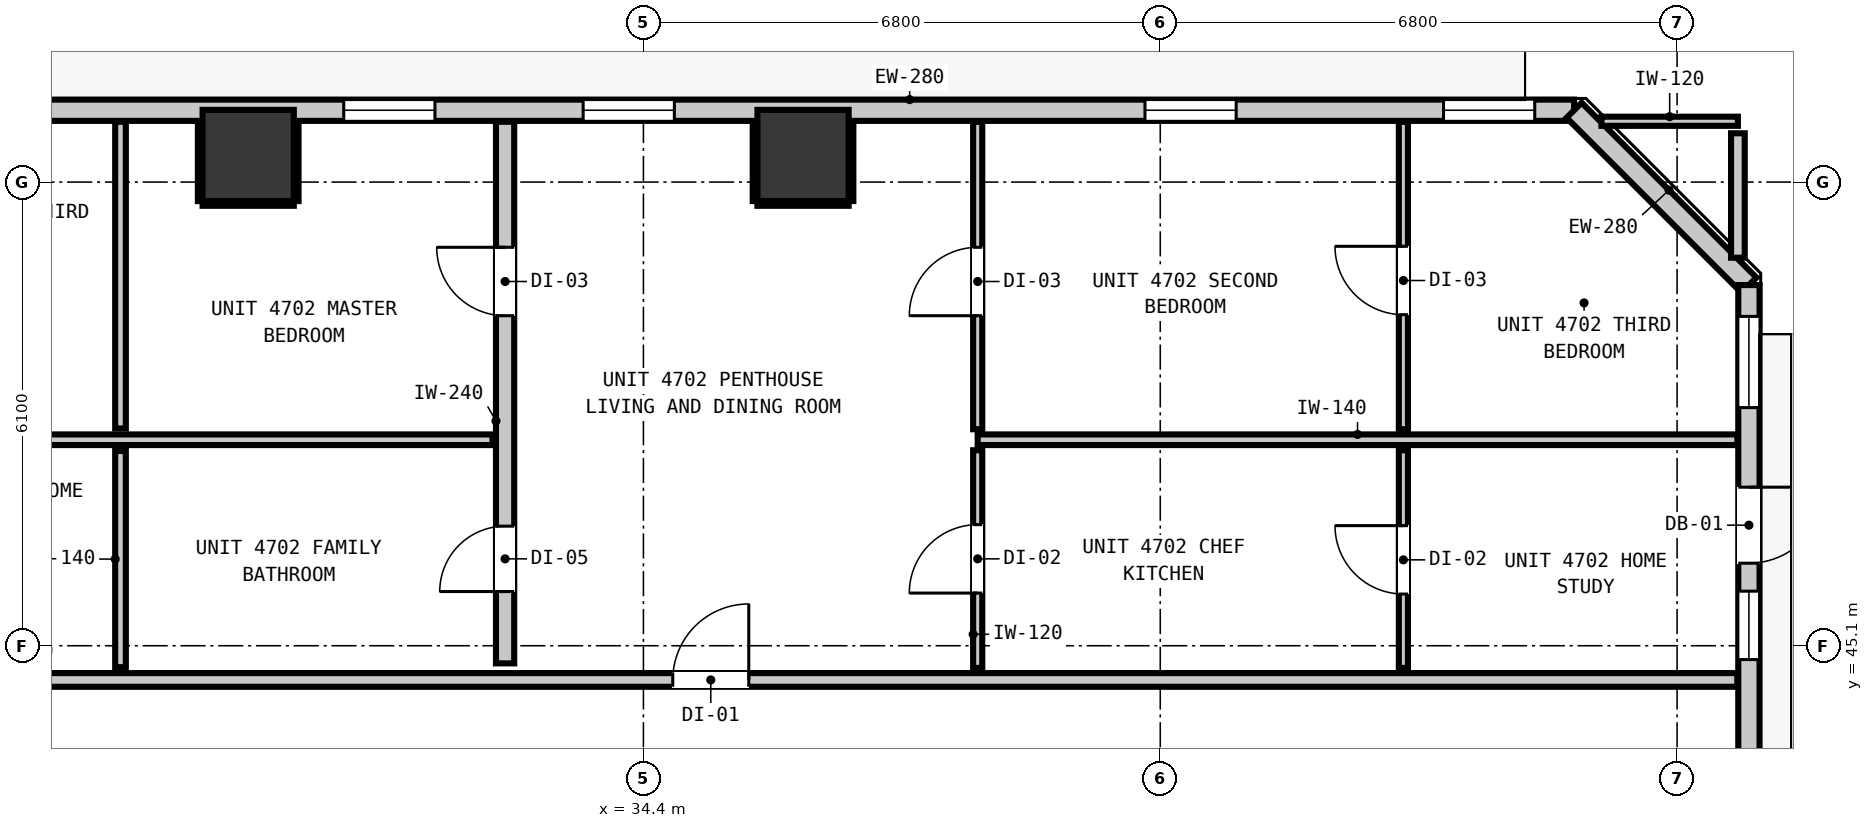
"""IFC4 building model, lengths in metres.
Left out: names, types, materials, properties, quantities, classifications, styles, units other than length and angle.
Written with IfcOpenShell. Run it as: python <this file> out.ifc"""

import sys

from ifc_helpers import new_model, si_unit, direction, frame, frame_2d, origin, origin_2d, place, context, subcontext, project, spatial, rectangle, extrude, element, fill, save


model = new_model("IFC4")
c1 = context("Model", 3, precision=1e-05, world=origin(), true_north=direction((0.0, 1.0)))
c2 = subcontext(c1, "Body", "Model", "MODEL_VIEW")
j1 = project(units=[si_unit("LENGTHUNIT", "METRE"), si_unit("PLANEANGLEUNIT", "RADIAN")], contexts=[c1])
p1 = place(None, origin())
s1 = spatial("IfcSite", under=j1, at=p1, CompositionType="ELEMENT")
p2 = place(p1, origin())
s2 = spatial("IfcBuilding", under=s1, at=p2, CompositionType="ELEMENT")
p3 = place(p2, frame((0.0, 0.0, 162.52)))
s3 = spatial("IfcBuildingStorey", under=s2, at=p3, CompositionType="ELEMENT", Elevation=162.52)
for number, where, z_axis, x_axis in (
    (1, (29.2, 51.55, 0.0), (0.0, 0.0, 1.0), (1.0, 0.0, 0.0)),
    (2, (36.5, 51.55, 0.0), (0.0, 0.0, 1.0), (1.0, 0.0, 0.0)),
):
    element("IfcColumn", number, at=place(p3, frame(where, z_axis=z_axis, x_axis=x_axis)), inside=s3, PredefinedType="COLUMN", context=c2, shape_type="SweptSolid", body=[
        extrude(rectangle(XDim=1.2, YDim=1.2, at=origin_2d()), origin(), (0.0, 0.0, 1.0), 2.9),
    ])
p4 = place(p3, frame((11.555, 52.145, 0.0), z_axis=(0.0, 0.0, 1.0), x_axis=(1.0, 0.0, 0.0)))
e3 = element("IfcWall", 3, at=p4, inside=s3, PredefinedType="STANDARD", context=c2, shape_type="SweptSolid", body=[
    extrude(rectangle(XDim=35.09, YDim=0.28, at=frame_2d((17.545, 0.0))), origin(), (0.0, 0.0, 1.0), 2.9),
])
p5 = place(p4, frame((4.062, 0.0, 0.0)))
e4 = element("IfcOpeningElement", 4, at=p5, cuts=e3, PredefinedType="OPENING", context=c2, shape_type="SweptSolid", body=[
    extrude(rectangle(XDim=1.0, YDim=2.15, at=frame_2d((0.5, 1.075))), frame((0.0, 0.15, 0.0), z_axis=(0.0, -1.0, 0.0), x_axis=(1.0, 0.0, 0.0)), (0.0, 0.0, 1.0), 0.3),
])
p6 = place(p4, frame((5.813, 0.0, 0.85)))
e5 = element("IfcOpeningElement", 5, at=p6, cuts=e3, PredefinedType="OPENING", context=c2, shape_type="SweptSolid", body=[
    extrude(rectangle(XDim=1.2, YDim=1.8, at=frame_2d((0.6, 0.9))), frame((0.0, 0.15, 0.0), z_axis=(0.0, -1.0, 0.0), x_axis=(1.0, 0.0, 0.0)), (0.0, 0.0, 1.0), 0.3),
])
p7 = place(p4, frame((0.378, 0.0, 0.85)))
e6 = element("IfcOpeningElement", 6, at=p7, cuts=e3, PredefinedType="OPENING", context=c2, shape_type="SweptSolid", body=[
    extrude(rectangle(XDim=0.58, YDim=1.5, at=frame_2d((0.29, 0.75))), frame((0.0, 0.15, 0.0), z_axis=(0.0, -1.0, 0.0), x_axis=(1.0, 0.0, 0.0)), (0.0, 0.0, 1.0), 0.3),
])
p8 = place(p4, frame((10.429, 0.0, 0.85)))
e7 = element("IfcOpeningElement", 7, at=p8, cuts=e3, PredefinedType="OPENING", context=c2, shape_type="SweptSolid", body=[
    extrude(rectangle(XDim=1.2, YDim=1.8, at=frame_2d((0.6, 0.9))), frame((0.0, 0.15, 0.0), z_axis=(0.0, -1.0, 0.0), x_axis=(1.0, 0.0, 0.0)), (0.0, 0.0, 1.0), 0.3),
])
p9 = place(p4, frame((13.539, 0.0, 0.85)))
e8 = element("IfcOpeningElement", 8, at=p9, cuts=e3, PredefinedType="OPENING", context=c2, shape_type="SweptSolid", body=[
    extrude(rectangle(XDim=1.2, YDim=1.8, at=frame_2d((0.6, 0.9))), frame((0.0, 0.15, 0.0), z_axis=(0.0, -1.0, 0.0), x_axis=(1.0, 0.0, 0.0)), (0.0, 0.0, 1.0), 0.3),
])
p10 = place(p4, frame((22.052, 0.0, 0.85)))
e9 = element("IfcOpeningElement", 9, at=p10, cuts=e3, PredefinedType="OPENING", context=c2, shape_type="SweptSolid", body=[
    extrude(rectangle(XDim=1.2, YDim=1.8, at=frame_2d((0.6, 0.9))), frame((0.0, 0.15, 0.0), z_axis=(0.0, -1.0, 0.0), x_axis=(1.0, 0.0, 0.0)), (0.0, 0.0, 1.0), 0.3),
])
p11 = place(p4, frame((18.902, 0.0, 0.85)))
e10 = element("IfcOpeningElement", 10, at=p11, cuts=e3, PredefinedType="OPENING", context=c2, shape_type="SweptSolid", body=[
    extrude(rectangle(XDim=1.2, YDim=1.8, at=frame_2d((0.6, 0.9))), frame((0.0, 0.15, 0.0), z_axis=(0.0, -1.0, 0.0), x_axis=(1.0, 0.0, 0.0)), (0.0, 0.0, 1.0), 0.3),
])
p12 = place(p4, frame((29.444, 0.0, 0.85)))
e11 = element("IfcOpeningElement", 11, at=p12, cuts=e3, PredefinedType="OPENING", context=c2, shape_type="SweptSolid", body=[
    extrude(rectangle(XDim=1.2, YDim=1.8, at=frame_2d((0.6, 0.9))), frame((0.0, 0.15, 0.0), z_axis=(0.0, -1.0, 0.0), x_axis=(1.0, 0.0, 0.0)), (0.0, 0.0, 1.0), 0.3),
])
p13 = place(p4, frame((33.372, 0.0, 0.85)))
e12 = element("IfcOpeningElement", 12, at=p13, cuts=e3, PredefinedType="OPENING", context=c2, shape_type="SweptSolid", body=[
    extrude(rectangle(XDim=1.2, YDim=1.8, at=frame_2d((0.6, 0.9))), frame((0.0, 0.15, 0.0), z_axis=(0.0, -1.0, 0.0), x_axis=(1.0, 0.0, 0.0)), (0.0, 0.0, 1.0), 0.3),
])
p14 = place(p3, frame((46.645, 52.145, 0.0), z_axis=(0.0, 0.0, 1.0), x_axis=(0.707106781187, -0.707106781187, 0.0)))
e13 = element("IfcWall", 13, at=p14, inside=s3, PredefinedType="STANDARD", context=c2, shape_type="SweptSolid", body=[
    extrude(rectangle(XDim=3.253, YDim=0.28, at=frame_2d((1.626, 0.0))), origin(), (0.0, 0.0, 1.0), 2.9),
])
p15 = place(p3, frame((48.945, 49.845, 0.0), z_axis=(0.0, 0.0, 1.0), x_axis=(0.0, -1.0, 0.0)))
e14 = element("IfcWall", 14, at=p15, inside=s3, PredefinedType="STANDARD", context=c2, shape_type="SweptSolid", body=[
    extrude(rectangle(XDim=32.29, YDim=0.28, at=frame_2d((16.145, 0.0))), origin(), (0.0, 0.0, 1.0), 2.9),
])
p16 = place(p15, frame((2.659, 0.0, 0.0)))
e15 = element("IfcOpeningElement", 15, at=p16, cuts=e14, PredefinedType="OPENING", context=c2, shape_type="SweptSolid", body=[
    extrude(rectangle(XDim=1.0, YDim=2.15, at=frame_2d((0.5, 1.075))), frame((0.0, 0.15, 0.0), z_axis=(0.0, -1.0, 0.0), x_axis=(1.0, 0.0, 0.0)), (0.0, 0.0, 1.0), 0.3),
])
p17 = place(p15, frame((30.747, 0.0, 0.85)))
e16 = element("IfcOpeningElement", 16, at=p17, cuts=e14, PredefinedType="OPENING", context=c2, shape_type="SweptSolid", body=[
    extrude(rectangle(XDim=1.2, YDim=1.8, at=frame_2d((0.6, 0.9))), frame((0.0, 0.15, 0.0), z_axis=(0.0, -1.0, 0.0), x_axis=(1.0, 0.0, 0.0)), (0.0, 0.0, 1.0), 0.3),
])
p18 = place(p15, frame((4.027, 0.0, 0.85)))
e17 = element("IfcOpeningElement", 17, at=p18, cuts=e14, PredefinedType="OPENING", context=c2, shape_type="SweptSolid", body=[
    extrude(rectangle(XDim=0.9, YDim=1.5, at=frame_2d((0.45, 0.75))), frame((0.0, 0.15, 0.0), z_axis=(0.0, -1.0, 0.0), x_axis=(1.0, 0.0, 0.0)), (0.0, 0.0, 1.0), 0.3),
])
p19 = place(p15, frame((0.412, 0.0, 0.85)))
e18 = element("IfcOpeningElement", 18, at=p19, cuts=e14, PredefinedType="OPENING", context=c2, shape_type="SweptSolid", body=[
    extrude(rectangle(XDim=1.2, YDim=1.8, at=frame_2d((0.6, 0.9))), frame((0.0, 0.15, 0.0), z_axis=(0.0, -1.0, 0.0), x_axis=(1.0, 0.0, 0.0)), (0.0, 0.0, 1.0), 0.3),
])
p20 = place(p15, frame((22.895, 0.0, 0.85)))
e19 = element("IfcOpeningElement", 19, at=p20, cuts=e14, PredefinedType="OPENING", context=c2, shape_type="SweptSolid", body=[
    extrude(rectangle(XDim=1.2, YDim=1.8, at=frame_2d((0.6, 0.9))), frame((0.0, 0.15, 0.0), z_axis=(0.0, -1.0, 0.0), x_axis=(1.0, 0.0, 0.0)), (0.0, 0.0, 1.0), 0.3),
])
p21 = place(p3, frame((9.407, 44.65, 0.0), z_axis=(0.0, 0.0, 1.0), x_axis=(1.0, 0.0, 0.0)))
e20 = element("IfcWall", 20, at=p21, inside=s3, PredefinedType="PARTITIONING", context=c2, shape_type="SweptSolid", body=[
    extrude(rectangle(XDim=39.386, YDim=0.18, at=frame_2d((19.693, 0.0))), origin(), (0.0, 0.0, 1.0), 2.9),
])
p22 = place(p21, frame((7.193, 0.0, 0.0)))
e21 = element("IfcOpeningElement", 21, at=p22, cuts=e20, PredefinedType="OPENING", context=c2, shape_type="SweptSolid", body=[
    extrude(rectangle(XDim=1.0, YDim=2.15, at=frame_2d((0.5, 1.075))), frame((0.0, 0.1, 0.0), z_axis=(0.0, -1.0, 0.0), x_axis=(1.0, 0.0, 0.0)), (0.0, 0.0, 1.0), 0.2),
])
p23 = place(p21, frame((25.379, 0.0, 0.0)))
e22 = element("IfcOpeningElement", 22, at=p23, cuts=e20, PredefinedType="OPENING", context=c2, shape_type="SweptSolid", body=[
    extrude(rectangle(XDim=1.0, YDim=2.15, at=frame_2d((0.5, 1.075))), frame((0.0, 0.1, 0.0), z_axis=(0.0, -1.0, 0.0), x_axis=(1.0, 0.0, 0.0)), (0.0, 0.0, 1.0), 0.2),
])
p24 = place(p3, frame((19.22, 47.81, 0.0), z_axis=(0.0, 0.0, 1.0), x_axis=(1.0, 0.0, 0.0)))
e23 = element("IfcWall", 23, at=p24, inside=s3, PredefinedType="PARTITIONING", context=c2, shape_type="SweptSolid", body=[
    extrude(rectangle(XDim=13.194, YDim=0.14, at=frame_2d((6.597, 0.0))), origin(), (0.0, 0.0, 1.0), 2.9),
])
p25 = place(p3, frame((38.798, 47.81, 0.0), z_axis=(0.0, 0.0, 1.0), x_axis=(1.0, 0.0, 0.0)))
e24 = element("IfcWall", 24, at=p25, inside=s3, PredefinedType="PARTITIONING", context=c2, shape_type="SweptSolid", body=[
    extrude(rectangle(XDim=9.995, YDim=0.14, at=frame_2d((4.998, 0.0))), origin(), (0.0, 0.0, 1.0), 2.9),
])
p26 = place(p3, frame((47.005, 52.0, 0.0), z_axis=(0.0, 0.0, 1.0), x_axis=(1.0, 0.0, 0.0)))
e25 = element("IfcWall", 25, at=p26, inside=s3, PredefinedType="PARTITIONING", context=c2, shape_type="SweptSolid", body=[
    extrude(rectangle(XDim=1.795, YDim=0.12, at=frame_2d((0.897, 0.0))), origin(), (0.0, 0.0, 1.0), 2.9),
])
p27 = place(p3, frame((32.58, 44.868, 0.0), z_axis=(0.0, 0.0, 1.0), x_axis=(0.0, 1.0, 0.0)))
e26 = element("IfcWall", 26, at=p27, inside=s3, PredefinedType="PARTITIONING", context=c2, shape_type="SweptSolid", body=[
    extrude(rectangle(XDim=7.125, YDim=0.24, at=frame_2d((3.562, 0.0))), origin(), (0.0, 0.0, 1.0), 2.9),
])
p28 = place(p27, frame((0.945, 0.0, 0.0)))
e27 = element("IfcOpeningElement", 27, at=p28, cuts=e26, PredefinedType="OPENING", context=c2, shape_type="SweptSolid", body=[
    extrude(rectangle(XDim=0.86, YDim=2.02, at=frame_2d((0.43, 1.01))), frame((0.0, 0.13, 0.0), z_axis=(0.0, -1.0, 0.0), x_axis=(1.0, 0.0, 0.0)), (0.0, 0.0, 1.0), 0.26),
])
p29 = place(p27, frame((4.574, 0.0, 0.0)))
e28 = element("IfcOpeningElement", 28, at=p29, cuts=e26, PredefinedType="OPENING", context=c2, shape_type="SweptSolid", body=[
    extrude(rectangle(XDim=0.9, YDim=2.1, at=frame_2d((0.45, 1.05))), frame((0.0, 0.13, 0.0), z_axis=(0.0, -1.0, 0.0), x_axis=(1.0, 0.0, 0.0)), (0.0, 0.0, 1.0), 0.26),
])
p30 = place(p3, frame((48.8, 50.205, 0.0), z_axis=(0.0, 0.0, 1.0), x_axis=(0.0, 1.0, 0.0)))
e29 = element("IfcWall", 29, at=p30, inside=s3, PredefinedType="PARTITIONING", context=c2, shape_type="SweptSolid", body=[
    extrude(rectangle(XDim=1.637, YDim=0.18, at=frame_2d((0.818, 0.0))), origin(), (0.0, 0.0, 1.0), 2.9),
])
p31 = place(p3, frame((27.52, 44.818, 0.0), z_axis=(0.0, 0.0, 1.0), x_axis=(0.0, 1.0, 0.0)))
e30 = element("IfcWall", 30, at=p31, inside=s3, PredefinedType="PARTITIONING", context=c2, shape_type="SweptSolid", body=[
    extrude(rectangle(XDim=2.844, YDim=0.14, at=frame_2d((1.422, 0.0))), origin(), (0.0, 0.0, 1.0), 2.9),
])
p32 = place(p3, frame((27.52, 47.958, 0.0), z_axis=(0.0, 0.0, 1.0), x_axis=(0.0, 1.0, 0.0)))
e31 = element("IfcWall", 31, at=p32, inside=s3, PredefinedType="PARTITIONING", context=c2, shape_type="SweptSolid", body=[
    extrude(rectangle(XDim=4.035, YDim=0.14, at=frame_2d((2.018, 0.0))), origin(), (0.0, 0.0, 1.0), 2.9),
])
p33 = place(p3, frame((38.798, 44.808, 0.0), z_axis=(0.0, 0.0, 1.0), x_axis=(0.0, 1.0, 0.0)))
e32 = element("IfcWall", 32, at=p33, inside=s3, PredefinedType="PARTITIONING", context=c2, shape_type="SweptSolid", body=[
    extrude(rectangle(XDim=2.864, YDim=0.12, at=frame_2d((1.432, 0.0))), origin(), (0.0, 0.0, 1.0), 2.9),
])
p34 = place(p33, frame((0.985, 0.0, 0.0)))
e33 = element("IfcOpeningElement", 33, at=p34, cuts=e32, PredefinedType="OPENING", context=c2, shape_type="SweptSolid", body=[
    extrude(rectangle(XDim=0.9, YDim=2.1, at=frame_2d((0.45, 1.05))), frame((0.0, 0.07, 0.0), z_axis=(0.0, -1.0, 0.0), x_axis=(1.0, 0.0, 0.0)), (0.0, 0.0, 1.0), 0.14),
])
p35 = place(p3, frame((38.798, 47.948, 0.0), z_axis=(0.0, 0.0, 1.0), x_axis=(0.0, 1.0, 0.0)))
e34 = element("IfcWall", 34, at=p35, inside=s3, PredefinedType="PARTITIONING", context=c2, shape_type="SweptSolid", body=[
    extrude(rectangle(XDim=4.045, YDim=0.12, at=frame_2d((2.022, 0.0))), origin(), (0.0, 0.0, 1.0), 2.9),
])
p36 = place(p35, frame((1.494, 0.0, 0.0)))
e35 = element("IfcOpeningElement", 35, at=p36, cuts=e34, PredefinedType="OPENING", context=c2, shape_type="SweptSolid", body=[
    extrude(rectangle(XDim=0.9, YDim=2.1, at=frame_2d((0.45, 1.05))), frame((0.0, 0.07, 0.0), z_axis=(0.0, -1.0, 0.0), x_axis=(1.0, 0.0, 0.0)), (0.0, 0.0, 1.0), 0.14),
])
p37 = place(p3, frame((44.399, 44.808, 0.0), z_axis=(0.0, 0.0, 1.0), x_axis=(0.0, 1.0, 0.0)))
e36 = element("IfcWall", 36, at=p37, inside=s3, PredefinedType="PARTITIONING", context=c2, shape_type="SweptSolid", body=[
    extrude(rectangle(XDim=2.864, YDim=0.12, at=frame_2d((1.432, 0.0))), origin(), (0.0, 0.0, 1.0), 2.9),
])
p38 = place(p37, frame((0.972, 0.0, 0.0)))
e37 = element("IfcOpeningElement", 37, at=p38, cuts=e36, PredefinedType="OPENING", context=c2, shape_type="SweptSolid", body=[
    extrude(rectangle(XDim=0.9, YDim=2.1, at=frame_2d((0.45, 1.05))), frame((0.0, 0.07, 0.0), z_axis=(0.0, -1.0, 0.0), x_axis=(1.0, 0.0, 0.0)), (0.0, 0.0, 1.0), 0.14),
])
p39 = place(p3, frame((44.399, 47.948, 0.0), z_axis=(0.0, 0.0, 1.0), x_axis=(0.0, 1.0, 0.0)))
e38 = element("IfcWall", 38, at=p39, inside=s3, PredefinedType="PARTITIONING", context=c2, shape_type="SweptSolid", body=[
    extrude(rectangle(XDim=4.045, YDim=0.12, at=frame_2d((2.022, 0.0))), origin(), (0.0, 0.0, 1.0), 2.9),
])
p40 = place(p39, frame((1.507, 0.0, 0.0)))
e39 = element("IfcOpeningElement", 39, at=p40, cuts=e38, PredefinedType="OPENING", context=c2, shape_type="SweptSolid", body=[
    extrude(rectangle(XDim=0.9, YDim=2.1, at=frame_2d((0.45, 1.05))), frame((0.0, 0.07, 0.0), z_axis=(0.0, -1.0, 0.0), x_axis=(1.0, 0.0, 0.0)), (0.0, 0.0, 1.0), 0.14),
])
p41 = place(p3, frame((28.6, 50.918, 0.0), z_axis=(0.0, 0.0, 1.0), x_axis=(1.0, 0.0, 0.0)))
e40 = element("IfcWall", 40, at=p41, inside=s3, PredefinedType="PARTITIONING", context=c2, shape_type="SweptSolid", body=[
    extrude(rectangle(XDim=1.2, YDim=0.06, at=frame_2d((0.6, 0.0))), origin(), (0.0, 0.0, 1.0), 1.45),
])
for number, where, z_axis, x_axis in (
    (41, (28.568, 50.95, 0.0), (0.0, 0.0, 1.0), (0.0, 1.0, 0.0)),
    (42, (29.832, 50.95, 0.0), (0.0, 0.0, 1.0), (0.0, 1.0, 0.0)),
):
    element("IfcWall", number, at=place(p3, frame(where, z_axis=z_axis, x_axis=x_axis)), inside=s3, PredefinedType="PARTITIONING", context=c2, shape_type="SweptSolid", body=[
        extrude(rectangle(XDim=1.04, YDim=0.06, at=frame_2d((0.52, 0.0))), origin(), (0.0, 0.0, 1.0), 0.905),
    ])
p42 = place(p3, frame((35.9, 50.918, 0.0), z_axis=(0.0, 0.0, 1.0), x_axis=(1.0, 0.0, 0.0)))
e43 = element("IfcWall", 43, at=p42, inside=s3, PredefinedType="PARTITIONING", context=c2, shape_type="SweptSolid", body=[
    extrude(rectangle(XDim=1.2, YDim=0.06, at=frame_2d((0.6, 0.0))), origin(), (0.0, 0.0, 1.0), 1.45),
])
for number, where, z_axis, x_axis in (
    (44, (35.868, 50.95, 0.0), (0.0, 0.0, 1.0), (0.0, 1.0, 0.0)),
    (45, (37.132, 50.95, 0.0), (0.0, 0.0, 1.0), (0.0, 1.0, 0.0)),
):
    element("IfcWall", number, at=place(p3, frame(where, z_axis=z_axis, x_axis=x_axis)), inside=s3, PredefinedType="PARTITIONING", context=c2, shape_type="SweptSolid", body=[
        extrude(rectangle(XDim=1.04, YDim=0.06, at=frame_2d((0.52, 0.0))), origin(), (0.0, 0.0, 1.0), 0.905),
    ])
p43 = place(p16, origin())
e46 = element("IfcDoor", 46, at=p43, inside=s3, OperationType="SINGLE_SWING_LEFT", PredefinedType="DOOR", context=c2, shape_type="SweptSolid", body=[
    extrude(rectangle(XDim=1.0, YDim=2.15, at=frame_2d((0.5, 1.075))), frame((0.0, 0.025, 0.0), z_axis=(0.0, -1.0, 0.0), x_axis=(1.0, 0.0, 0.0)), (0.0, 0.0, 1.0), 0.05),
])
fill(e15, e46)
p44 = place(p10, origin())
e47 = element("IfcWindow", 47, at=p44, inside=s3, PartitioningType="SINGLE_PANEL", PredefinedType="WINDOW", context=c2, shape_type="SweptSolid", body=[
    extrude(rectangle(XDim=1.2, YDim=1.8, at=frame_2d((0.6, 0.9))), frame((0.0, 0.03, 0.0), z_axis=(0.0, -1.0, 0.0), x_axis=(1.0, 0.0, 0.0)), (0.0, 0.0, 1.0), 0.06),
])
fill(e9, e47)
p45 = place(p11, origin())
e48 = element("IfcWindow", 48, at=p45, inside=s3, PartitioningType="SINGLE_PANEL", PredefinedType="WINDOW", context=c2, shape_type="SweptSolid", body=[
    extrude(rectangle(XDim=1.2, YDim=1.8, at=frame_2d((0.6, 0.9))), frame((0.0, 0.03, 0.0), z_axis=(0.0, -1.0, 0.0), x_axis=(1.0, 0.0, 0.0)), (0.0, 0.0, 1.0), 0.06),
])
fill(e10, e48)
p46 = place(p12, origin())
e49 = element("IfcWindow", 49, at=p46, inside=s3, PartitioningType="SINGLE_PANEL", PredefinedType="WINDOW", context=c2, shape_type="SweptSolid", body=[
    extrude(rectangle(XDim=1.2, YDim=1.8, at=frame_2d((0.6, 0.9))), frame((0.0, 0.03, 0.0), z_axis=(0.0, -1.0, 0.0), x_axis=(1.0, 0.0, 0.0)), (0.0, 0.0, 1.0), 0.06),
])
fill(e11, e49)
p47 = place(p13, origin())
e50 = element("IfcWindow", 50, at=p47, inside=s3, PartitioningType="SINGLE_PANEL", PredefinedType="WINDOW", context=c2, shape_type="SweptSolid", body=[
    extrude(rectangle(XDim=1.2, YDim=1.8, at=frame_2d((0.6, 0.9))), frame((0.0, 0.03, 0.0), z_axis=(0.0, -1.0, 0.0), x_axis=(1.0, 0.0, 0.0)), (0.0, 0.0, 1.0), 0.06),
])
fill(e12, e50)
p48 = place(p18, origin())
e51 = element("IfcWindow", 51, at=p48, inside=s3, PartitioningType="SINGLE_PANEL", PredefinedType="WINDOW", context=c2, shape_type="SweptSolid", body=[
    extrude(rectangle(XDim=0.9, YDim=1.5, at=frame_2d((0.45, 0.75))), frame((0.0, 0.03, 0.0), z_axis=(0.0, -1.0, 0.0), x_axis=(1.0, 0.0, 0.0)), (0.0, 0.0, 1.0), 0.06),
])
fill(e17, e51)
p49 = place(p19, origin())
e52 = element("IfcWindow", 52, at=p49, inside=s3, PartitioningType="SINGLE_PANEL", PredefinedType="WINDOW", context=c2, shape_type="SweptSolid", body=[
    extrude(rectangle(XDim=1.2, YDim=1.8, at=frame_2d((0.6, 0.9))), frame((0.0, 0.03, 0.0), z_axis=(0.0, -1.0, 0.0), x_axis=(1.0, 0.0, 0.0)), (0.0, 0.0, 1.0), 0.06),
])
fill(e18, e52)
p50 = place(p23, origin())
e53 = element("IfcDoor", 53, at=p50, inside=s3, OperationType="SINGLE_SWING_RIGHT", PredefinedType="DOOR", context=c2, shape_type="SweptSolid", body=[
    extrude(rectangle(XDim=1.0, YDim=2.15, at=frame_2d((0.5, 1.075))), frame((0.0, 0.025, 0.0), z_axis=(0.0, -1.0, 0.0), x_axis=(1.0, 0.0, 0.0)), (0.0, 0.0, 1.0), 0.05),
])
fill(e22, e53)
p51 = place(p28, origin())
e54 = element("IfcDoor", 54, at=p51, inside=s3, OperationType="SINGLE_SWING_LEFT", PredefinedType="DOOR", context=c2, shape_type="SweptSolid", body=[
    extrude(rectangle(XDim=0.86, YDim=2.02, at=frame_2d((0.43, 1.01))), frame((0.0, 0.025, 0.0), z_axis=(0.0, -1.0, 0.0), x_axis=(1.0, 0.0, 0.0)), (0.0, 0.0, 1.0), 0.05),
])
fill(e27, e54)
p52 = place(p29, origin())
e55 = element("IfcDoor", 55, at=p52, inside=s3, OperationType="SINGLE_SWING_RIGHT", PredefinedType="DOOR", context=c2, shape_type="SweptSolid", body=[
    extrude(rectangle(XDim=0.9, YDim=2.1, at=frame_2d((0.45, 1.05))), frame((0.0, 0.025, 0.0), z_axis=(0.0, -1.0, 0.0), x_axis=(1.0, 0.0, 0.0)), (0.0, 0.0, 1.0), 0.05),
])
fill(e28, e55)
p53 = place(p34, origin())
e56 = element("IfcDoor", 56, at=p53, inside=s3, OperationType="SINGLE_SWING_LEFT", PredefinedType="DOOR", context=c2, shape_type="SweptSolid", body=[
    extrude(rectangle(XDim=0.9, YDim=2.1, at=frame_2d((0.45, 1.05))), frame((0.0, 0.025, 0.0), z_axis=(0.0, -1.0, 0.0), x_axis=(1.0, 0.0, 0.0)), (0.0, 0.0, 1.0), 0.05),
])
fill(e33, e56)
p54 = place(p38, origin())
e57 = element("IfcDoor", 57, at=p54, inside=s3, OperationType="SINGLE_SWING_RIGHT", PredefinedType="DOOR", context=c2, shape_type="SweptSolid", body=[
    extrude(rectangle(XDim=0.9, YDim=2.1, at=frame_2d((0.45, 1.05))), frame((0.0, 0.025, 0.0), z_axis=(0.0, -1.0, 0.0), x_axis=(1.0, 0.0, 0.0)), (0.0, 0.0, 1.0), 0.05),
])
fill(e37, e57)
p55 = place(p36, origin())
e58 = element("IfcDoor", 58, at=p55, inside=s3, OperationType="SINGLE_SWING_LEFT", PredefinedType="DOOR", context=c2, shape_type="SweptSolid", body=[
    extrude(rectangle(XDim=0.9, YDim=2.1, at=frame_2d((0.45, 1.05))), frame((0.0, 0.025, 0.0), z_axis=(0.0, -1.0, 0.0), x_axis=(1.0, 0.0, 0.0)), (0.0, 0.0, 1.0), 0.05),
])
fill(e35, e58)
p56 = place(p40, origin())
e59 = element("IfcDoor", 59, at=p56, inside=s3, OperationType="SINGLE_SWING_RIGHT", PredefinedType="DOOR", context=c2, shape_type="SweptSolid", body=[
    extrude(rectangle(XDim=0.9, YDim=2.1, at=frame_2d((0.45, 1.05))), frame((0.0, 0.025, 0.0), z_axis=(0.0, -1.0, 0.0), x_axis=(1.0, 0.0, 0.0)), (0.0, 0.0, 1.0), 0.05),
])
fill(e39, e59)
save(model, sys.argv[1])
